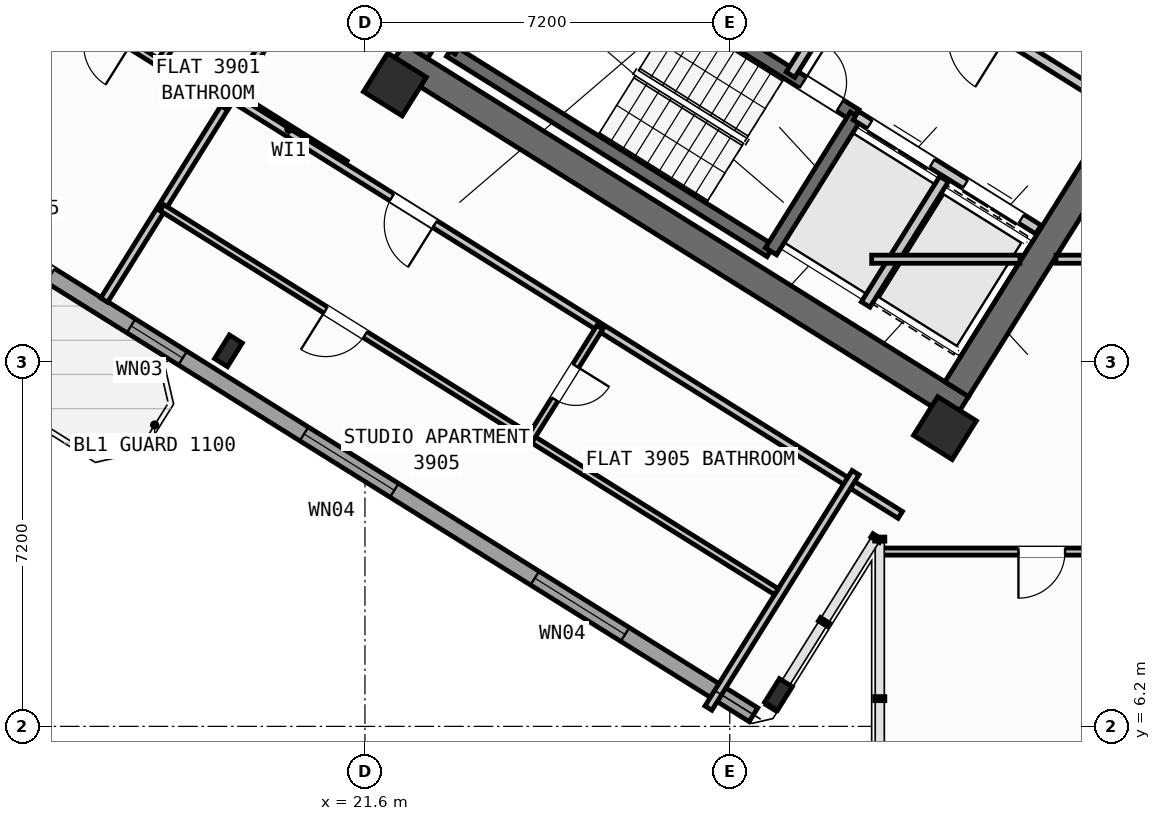
"""IFC4 building model, lengths in metres.
Left out: names, types, materials, properties, quantities, classifications, styles, units other than length and angle.
Written with IfcOpenShell. Run it as: python <this file> out.ifc"""

import sys

from ifc_helpers import new_model, si_unit, direction, frame, frame_2d, origin, origin_2d, place, context, subcontext, project, spatial, rectangle, hollow_rectangle, i_section, extrude, source, transform, mapped, element, fill, save


model = new_model("IFC4")
c1 = context("Model", 3, precision=1e-05, world=origin(), true_north=direction((0.0, 1.0)))
c2 = subcontext(c1, "Body", "Model", "MODEL_VIEW")
j1 = project(units=[si_unit("LENGTHUNIT", "METRE"), si_unit("PLANEANGLEUNIT", "RADIAN")], contexts=[c1])
p1 = place(None, origin())
s1 = spatial("IfcSite", under=j1, at=p1, CompositionType="ELEMENT")
p2 = place(p1, origin())
s2 = spatial("IfcBuilding", under=s1, at=p2, CompositionType="ELEMENT")
p3 = place(p2, frame((0.0, 0.0, 155.1)))
s3 = spatial("IfcBuildingStorey", under=s2, at=p3, CompositionType="ELEMENT", Elevation=155.1)
p4 = place(p3, frame((33.366, 12.477, 0.0), z_axis=(0.0, 0.0, 1.0), x_axis=(-0.848047359947, 0.529920442413, 0.0)))
e1 = element("IfcWall", 1, at=p4, inside=s3, PredefinedType="SHEAR", context=c2, shape_type="SweptSolid", body=[
    extrude(rectangle(XDim=13.14, YDim=0.55, at=frame_2d((6.57, 0.0))), origin(), (0.0, 0.0, 1.0), 3.35),
])
p5 = place(p3, frame((36.683, 18.304, 0.0), z_axis=(0.0, 0.0, 1.0), x_axis=(-0.529896466841, -0.848062341122, 0.0)))
e2 = element("IfcWall", 2, at=p5, inside=s3, PredefinedType="SHEAR", context=c2, shape_type="SweptSolid", body=[
    extrude(rectangle(XDim=6.425, YDim=0.55, at=frame_2d((3.212, 0.0))), origin(), (0.0, 0.0, 1.0), 3.35),
])
p6 = place(p3, frame((26.007, 24.976, 0.0), z_axis=(0.0, 0.0, 1.0), x_axis=(-0.529923795287, -0.848045264823, 0.0)))
e3 = element("IfcWall", 3, at=p6, inside=s3, PredefinedType="SHEAR", context=c2, shape_type="SweptSolid", body=[
    extrude(rectangle(XDim=6.425, YDim=0.55, at=frame_2d((3.212, 0.0))), origin(), (0.0, 0.0, 1.0), 3.35),
])
m1 = source(origin(), c2, "Body", "SweptSolid", [
    extrude(hollow_rectangle(XDim=0.9, YDim=0.9, WallThickness=0.036, at=origin_2d()), origin(), (0.0, 0.0, 1.0), 3.6),
])
p7 = place(p3, frame((33.046, 12.087, 0.0), z_axis=(0.0, 0.0, 1.0), x_axis=(-0.848048096156, 0.529919264233, 0.0)))
e4 = element("IfcColumn", 4, at=p7, inside=s3, PredefinedType="COLUMN", context=c2, shape_type="MappedRepresentation", body=[
    mapped(m1, transform((0.0, 0.0, 0.0), scale=1.0)),
])
m2 = source(origin(), c2, "Body", "SweptSolid", [
    extrude(i_section(OverallWidth=0.3, OverallDepth=0.55, WebThickness=0.015, FlangeThickness=0.029, at=origin_2d()), origin(), (0.0, 0.0, 1.0), 3.6),
])
p8 = place(p3, frame((29.761, 6.829, 0.0), z_axis=(0.0, 0.0, 1.0), x_axis=(-0.848048096156, 0.529919264233, 0.0)))
e5 = element("IfcColumn", 5, at=p8, inside=s3, PredefinedType="COLUMN", context=c2, shape_type="MappedRepresentation", body=[
    mapped(m2, transform((0.0, 0.0, 0.0), scale=1.0)),
])
p9 = place(p3, frame((22.191, 18.87, 0.0), z_axis=(0.0, 0.0, 1.0), x_axis=(-0.848048096156, 0.529919264233, 0.0)))
e6 = element("IfcColumn", 6, at=p9, inside=s3, PredefinedType="COLUMN", context=c2, shape_type="MappedRepresentation", body=[
    mapped(m1, transform((0.0, 0.0, 0.0), scale=1.0)),
])
p10 = place(p3, frame((18.906, 13.612, 0.0), z_axis=(0.0, 0.0, 1.0), x_axis=(-0.848048096156, 0.529919264233, 0.0)))
e7 = element("IfcColumn", 7, at=p10, inside=s3, PredefinedType="COLUMN", context=c2, shape_type="MappedRepresentation", body=[
    mapped(m2, transform((0.0, 0.0, 0.0), scale=1.0)),
])
p11 = place(p3, frame((29.268, 6.429, 0.0), z_axis=(0.0, 0.0, 1.0), x_axis=(-0.848049971435, 0.529916263149, 0.0)))
e8 = element("IfcWall", 8, at=p11, inside=s3, PredefinedType="STANDARD", context=c2, shape_type="SweptSolid", body=[
    extrude(rectangle(XDim=31.588, YDim=0.32, at=frame_2d((15.794, 0.0))), origin(), (0.0, 0.0, 1.0), 3.35),
])
p12 = place(p11, frame((16.362, 0.0, 0.0)))
e9 = element("IfcOpeningElement", 9, at=p12, cuts=e8, PredefinedType="OPENING", context=c2, shape_type="SweptSolid", body=[
    extrude(rectangle(XDim=1.2, YDim=2.15, at=frame_2d((0.6, 1.075))), frame((0.0, 0.17, 0.0), z_axis=(0.0, -1.0, 0.0), x_axis=(1.0, 0.0, 0.0)), (0.0, 0.0, 1.0), 0.34),
])
p13 = place(p11, frame((2.989, 0.0, 0.8)))
e10 = element("IfcOpeningElement", 10, at=p13, cuts=e8, PredefinedType="OPENING", context=c2, shape_type="SweptSolid", body=[
    extrude(rectangle(XDim=2.1, YDim=1.55, at=frame_2d((1.05, 0.775))), frame((0.0, 0.17, 0.0), z_axis=(0.0, -1.0, 0.0), x_axis=(1.0, 0.0, 0.0)), (0.0, 0.0, 1.0), 0.34),
])
p14 = place(p11, frame((8.359, 0.0, 0.8)))
e11 = element("IfcOpeningElement", 11, at=p14, cuts=e8, PredefinedType="OPENING", context=c2, shape_type="SweptSolid", body=[
    extrude(rectangle(XDim=2.1, YDim=1.55, at=frame_2d((1.05, 0.775))), frame((0.0, 0.17, 0.0), z_axis=(0.0, -1.0, 0.0), x_axis=(1.0, 0.0, 0.0)), (0.0, 0.0, 1.0), 0.34),
])
p15 = place(p11, frame((13.284, 0.0, 0.95)))
e12 = element("IfcOpeningElement", 12, at=p15, cuts=e8, PredefinedType="OPENING", context=c2, shape_type="SweptSolid", body=[
    extrude(rectangle(XDim=1.2, YDim=1.4, at=frame_2d((0.6, 0.7))), frame((0.0, 0.17, 0.0), z_axis=(0.0, -1.0, 0.0), x_axis=(1.0, 0.0, 0.0)), (0.0, 0.0, 1.0), 0.34),
])
p16 = place(p11, frame((20.259, 0.0, 0.95)))
e13 = element("IfcOpeningElement", 13, at=p16, cuts=e8, PredefinedType="OPENING", context=c2, shape_type="SweptSolid", body=[
    extrude(rectangle(XDim=1.2, YDim=1.4, at=frame_2d((0.6, 0.7))), frame((0.0, 0.17, 0.0), z_axis=(0.0, -1.0, 0.0), x_axis=(1.0, 0.0, 0.0)), (0.0, 0.0, 1.0), 0.34),
])
p17 = place(p11, frame((22.929, 0.0, 0.95)))
e14 = element("IfcOpeningElement", 14, at=p17, cuts=e8, PredefinedType="OPENING", context=c2, shape_type="SweptSolid", body=[
    extrude(rectangle(XDim=1.2, YDim=1.4, at=frame_2d((0.6, 0.7))), frame((0.0, 0.17, 0.0), z_axis=(0.0, -1.0, 0.0), x_axis=(1.0, 0.0, 0.0)), (0.0, 0.0, 1.0), 0.34),
])
p18 = place(p11, frame((27.481, 0.0, 0.8)))
e15 = element("IfcOpeningElement", 15, at=p18, cuts=e8, PredefinedType="OPENING", context=c2, shape_type="SweptSolid", body=[
    extrude(rectangle(XDim=2.1, YDim=1.55, at=frame_2d((1.05, 0.775))), frame((0.0, 0.17, 0.0), z_axis=(0.0, -1.0, 0.0), x_axis=(1.0, 0.0, 0.0)), (0.0, 0.0, 1.0), 0.34),
])
p19 = place(p3, frame((29.605, 15.581, 0.0), z_axis=(0.0, 0.0, 1.0), x_axis=(-0.848036911448, 0.529937163087, 0.0)))
e16 = element("IfcWall", 16, at=p19, inside=s3, PredefinedType="SHEAR", context=c2, shape_type="SweptSolid", body=[
    extrude(rectangle(XDim=7.46, YDim=0.26, at=frame_2d((3.73, 0.0))), origin(), (0.0, 0.0, 1.0), 3.35),
])
p20 = place(p3, frame((31.28, 18.261, 0.0), z_axis=(0.0, 0.0, 1.0), x_axis=(-0.848051618787, 0.529913626805, 0.0)))
e17 = element("IfcWall", 17, at=p20, inside=s3, PredefinedType="SHEAR", context=c2, shape_type="SweptSolid", body=[
    extrude(rectangle(XDim=7.46, YDim=0.26, at=frame_2d((3.73, 0.0))), origin(), (0.0, 0.0, 1.0), 3.35),
])
p21 = place(p20, frame((0.36, 0.0, 0.0)))
e18 = element("IfcOpeningElement", 18, at=p21, cuts=e17, PredefinedType="OPENING", context=c2, shape_type="SweptSolid", body=[
    extrude(rectangle(XDim=0.86, YDim=2.05, at=frame_2d((0.43, 1.025))), frame((0.0, 0.14, 0.0), z_axis=(0.0, -1.0, 0.0), x_axis=(1.0, 0.0, 0.0)), (0.0, 0.0, 1.0), 0.28),
])
p22 = place(p3, frame((31.288, 18.256, 0.0), z_axis=(0.0, 0.0, 1.0), x_axis=(-0.529943379326, -0.848033026897, 0.0)))
e19 = element("IfcWall", 19, at=p22, inside=s3, PredefinedType="SHEAR", context=c2, shape_type="SweptSolid", body=[
    extrude(rectangle(XDim=3.16, YDim=0.26, at=frame_2d((1.58, 0.0))), origin(), (0.0, 0.0, 1.0), 3.35),
])
p23 = place(p3, frame((24.945, 22.22, 0.0), z_axis=(0.0, 0.0, 1.0), x_axis=(-0.529908658664, -0.84805472316, 0.0)))
e20 = element("IfcWall", 20, at=p23, inside=s3, PredefinedType="SHEAR", context=c2, shape_type="SweptSolid", body=[
    extrude(rectangle(XDim=3.16, YDim=0.26, at=frame_2d((1.58, 0.0))), origin(), (0.0, 0.0, 1.0), 3.35),
])
p24 = place(p3, frame((34.891, 16.005, 0.0), z_axis=(0.0, 0.0, 1.0), x_axis=(-0.848062873452, 0.529895614884, 0.0)))
e21 = element("IfcWall", 21, at=p24, inside=s3, PredefinedType="STANDARD", context=c2, shape_type="SweptSolid", body=[
    extrude(rectangle(XDim=4.248, YDim=0.2, at=frame_2d((2.124, 0.0))), origin(), (0.0, 0.0, 1.0), 3.34),
])
p25 = place(p24, frame((0.398, 0.0, 0.0)))
e22 = element("IfcOpeningElement", 22, at=p25, cuts=e21, PredefinedType="OPENING", context=c2, shape_type="SweptSolid", body=[
    extrude(rectangle(XDim=1.3, YDim=2.2, at=frame_2d((0.65, 1.1))), frame((0.0, 0.11, 0.0), z_axis=(0.0, -1.0, 0.0), x_axis=(1.0, 0.0, 0.0)), (0.0, 0.0, 1.0), 0.22),
])
p26 = place(p24, frame((2.473, 0.0, 0.0)))
e23 = element("IfcOpeningElement", 23, at=p26, cuts=e21, PredefinedType="OPENING", context=c2, shape_type="SweptSolid", body=[
    extrude(rectangle(XDim=1.45, YDim=2.25, at=frame_2d((0.725, 1.125))), frame((0.0, 0.11, 0.0), z_axis=(0.0, -1.0, 0.0), x_axis=(1.0, 0.0, 0.0)), (0.0, 0.0, 1.0), 0.22),
])
p27 = place(p3, frame((36.417, 18.447, 0.0), z_axis=(0.0, 0.0, 1.0), x_axis=(-0.848064879198, 0.529892404805, 0.0)))
e24 = element("IfcWall", 24, at=p27, inside=s3, PredefinedType="STANDARD", context=c2, shape_type="SweptSolid", body=[
    extrude(rectangle(XDim=5.768, YDim=0.2, at=frame_2d((2.884, 0.0))), origin(), (0.0, 0.0, 1.0), 3.34),
])
p28 = place(p27, frame((2.548, 0.0, 0.0)))
e25 = element("IfcOpeningElement", 25, at=p28, cuts=e24, PredefinedType="OPENING", context=c2, shape_type="SweptSolid", body=[
    extrude(rectangle(XDim=1.15, YDim=2.1, at=frame_2d((0.575, 1.05))), frame((0.0, 0.11, 0.0), z_axis=(0.0, -1.0, 0.0), x_axis=(1.0, 0.0, 0.0)), (0.0, 0.0, 1.0), 0.22),
])
p29 = place(p3, frame((33.029, 17.003, 0.0), z_axis=(0.0, 0.0, 1.0), x_axis=(-0.529916267533, -0.848049968695, 0.0)))
e26 = element("IfcWall", 26, at=p29, inside=s3, PredefinedType="STANDARD", context=c2, shape_type="SweptSolid", body=[
    extrude(rectangle(XDim=2.92, YDim=0.2, at=frame_2d((1.46, 0.0))), origin(), (0.0, 0.0, 1.0), 3.34),
])
p30 = place(p3, frame((31.525, 21.504, 0.0), z_axis=(0.0, 0.0, 1.0), x_axis=(-0.529907497854, -0.848055448493, 0.0)))
e27 = element("IfcWall", 27, at=p30, inside=s3, PredefinedType="STANDARD", context=c2, shape_type="SweptSolid", body=[
    extrude(rectangle(XDim=2.88, YDim=0.2, at=frame_2d((1.44, 0.0))), origin(), (0.0, 0.0, 1.0), 3.34),
])
p31 = place(p3, frame((21.206, 17.292, 0.0), z_axis=(0.0, 0.0, 1.0), x_axis=(-0.848050851465, 0.529914854792, 0.0)))
e28 = element("IfcWall", 28, at=p31, inside=s3, PredefinedType="PARTITIONING", context=c2, shape_type="SweptSolid", body=[
    extrude(rectangle(XDim=2.61, YDim=0.16, at=frame_2d((1.305, 0.0))), origin(), (0.0, 0.0, 1.0), 3.34),
])
p32 = place(p3, frame((20.719, 21.44, 0.0), z_axis=(0.0, 0.0, 1.0), x_axis=(-0.529906246318, -0.848056230514, 0.0)))
e29 = element("IfcWall", 29, at=p32, inside=s3, PredefinedType="PARTITIONING", context=c2, shape_type="SweptSolid", body=[
    extrude(rectangle(XDim=8.05, YDim=0.16, at=frame_2d((4.025, 0.0))), origin(), (0.0, 0.0, 1.0), 3.34),
])
p33 = place(p3, frame((16.519, 21.87, 0.0), z_axis=(0.0, 0.0, 1.0), x_axis=(-0.529922447305, -0.848046107144, 0.0)))
e30 = element("IfcWall", 30, at=p33, inside=s3, PredefinedType="PARTITIONING", context=c2, shape_type="SweptSolid", body=[
    extrude(rectangle(XDim=5.451, YDim=0.16, at=frame_2d((2.726, 0.0))), origin(), (0.0, 0.0, 1.0), 2.775),
])
p34 = place(p3, frame((18.86, 18.464, 0.0), z_axis=(0.0, 0.0, 1.0), x_axis=(-0.848059820872, 0.529900500304, 0.0)))
e31 = element("IfcWall", 31, at=p34, inside=s3, PredefinedType="PLUMBINGWALL", context=c2, shape_type="SweptSolid", body=[
    extrude(rectangle(XDim=3.79, YDim=0.14, at=frame_2d((1.895, 0.0))), origin(), (0.0, 0.0, 1.0), 3.34),
])
p35 = place(p34, frame((2.23, 0.0, 0.0)))
e32 = element("IfcOpeningElement", 32, at=p35, cuts=e31, PredefinedType="OPENING", context=c2, shape_type="SweptSolid", body=[
    extrude(rectangle(XDim=0.92, YDim=2.08, at=frame_2d((0.46, 1.04))), frame((0.0, 0.08, 0.0), z_axis=(0.0, -1.0, 0.0), x_axis=(1.0, 0.0, 0.0)), (0.0, 0.0, 1.0), 0.16),
])
p36 = place(p3, frame((19.405, 22.261, 0.0), z_axis=(0.0, 0.0, 1.0), x_axis=(-0.529898896701, -0.848060822863, 0.0)))
e33 = element("IfcWall", 33, at=p36, inside=s3, PredefinedType="PLUMBINGWALL", context=c2, shape_type="SweptSolid", body=[
    extrude(rectangle(XDim=3.51, YDim=0.14, at=frame_2d((1.755, 0.0))), origin(), (0.0, 0.0, 1.0), 2.995),
])
p37 = place(p36, frame((1.365, 0.0, 0.0)))
e34 = element("IfcOpeningElement", 34, at=p37, cuts=e33, PredefinedType="OPENING", context=c2, shape_type="SweptSolid", body=[
    extrude(rectangle(XDim=0.78, YDim=2.05, at=frame_2d((0.39, 1.025))), frame((0.0, 0.08, 0.0), z_axis=(0.0, -1.0, 0.0), x_axis=(1.0, 0.0, 0.0)), (0.0, 0.0, 1.0), 0.16),
])
p38 = place(p3, frame((32.164, 10.374, 0.0), z_axis=(0.0, 0.0, 1.0), x_axis=(-0.848044107957, 0.529925646633, 0.0)))
e35 = element("IfcWall", 35, at=p38, inside=s3, PredefinedType="PARTITIONING", context=c2, shape_type="SweptSolid", body=[
    extrude(rectangle(XDim=15.57, YDim=0.16, at=frame_2d((7.785, 0.0))), origin(), (0.0, 0.0, 1.0), 3.34),
])
p39 = place(p38, frame((10.83, 0.0, 0.0)))
e36 = element("IfcOpeningElement", 36, at=p39, cuts=e35, PredefinedType="OPENING", context=c2, shape_type="SweptSolid", body=[
    extrude(rectangle(XDim=1.0, YDim=2.1, at=frame_2d((0.5, 1.05))), frame((0.0, 0.09, 0.0), z_axis=(0.0, -1.0, 0.0), x_axis=(1.0, 0.0, 0.0)), (0.0, 0.0, 1.0), 0.18),
])
p40 = place(p3, frame((31.282, 11.208, 0.0), z_axis=(0.0, 0.0, 1.0), x_axis=(-0.529938869374, -0.84803584519, 0.0)))
e37 = element("IfcWall", 37, at=p40, inside=s3, PredefinedType="PARTITIONING", context=c2, shape_type="SweptSolid", body=[
    extrude(rectangle(XDim=5.48, YDim=0.16, at=frame_2d((2.74, 0.0))), origin(), (0.0, 0.0, 1.0), 3.34),
])
p41 = place(p3, frame((29.72, 8.859, 0.0), z_axis=(0.0, 0.0, 1.0), x_axis=(-0.848049134363, 0.529917602752, 0.0)))
e38 = element("IfcWall", 38, at=p41, inside=s3, PredefinedType="PLUMBINGWALL", context=c2, shape_type="SweptSolid", body=[
    extrude(rectangle(XDim=14.3, YDim=0.14, at=frame_2d((7.15, 0.0))), origin(), (0.0, 0.0, 1.0), 3.34),
])
p42 = place(p41, frame((9.57, 0.0, 0.0)))
e39 = element("IfcOpeningElement", 39, at=p42, cuts=e38, PredefinedType="OPENING", context=c2, shape_type="SweptSolid", body=[
    extrude(rectangle(XDim=0.92, YDim=2.08, at=frame_2d((0.46, 1.04))), frame((0.0, 0.08, 0.0), z_axis=(0.0, -1.0, 0.0), x_axis=(1.0, 0.0, 0.0)), (0.0, 0.0, 1.0), 0.16),
])
p43 = place(p3, frame((26.237, 14.078, 0.0), z_axis=(0.0, 0.0, 1.0), x_axis=(-0.52995640672, -0.848024885824, 0.0)))
e40 = element("IfcWall", 40, at=p43, inside=s3, PredefinedType="PLUMBINGWALL", context=c2, shape_type="SweptSolid", body=[
    extrude(rectangle(XDim=2.58, YDim=0.14, at=frame_2d((1.29, 0.0))), origin(), (0.0, 0.0, 1.0), 3.34),
])
p44 = place(p43, frame((0.9, 0.0, 0.0)))
e41 = element("IfcOpeningElement", 41, at=p44, cuts=e40, PredefinedType="OPENING", context=c2, shape_type="SweptSolid", body=[
    extrude(rectangle(XDim=0.78, YDim=2.05, at=frame_2d((0.39, 1.025))), frame((0.0, 0.08, 0.0), z_axis=(0.0, -1.0, 0.0), x_axis=(1.0, 0.0, 0.0)), (0.0, 0.0, 1.0), 0.16),
])
p45 = place(p3, frame((31.6, 15.42, 0.0), z_axis=(0.0, 0.0, 1.0), x_axis=(1.0, 0.0, 0.0)))
e42 = element("IfcWall", 42, at=p45, inside=s3, PredefinedType="PARTITIONING", context=c2, shape_type="SweptSolid", body=[
    extrude(rectangle(XDim=2.925, YDim=0.16, at=frame_2d((1.462, 0.0))), origin(), (0.0, 0.0, 1.0), 3.34),
])
p46 = place(p3, frame((35.237, 15.42, 0.0), z_axis=(0.0, 0.0, 1.0), x_axis=(1.0, 0.0, 0.0)))
e43 = element("IfcWall", 43, at=p46, inside=s3, PredefinedType="PARTITIONING", context=c2, shape_type="SweptSolid", body=[
    extrude(rectangle(XDim=15.432, YDim=0.16, at=frame_2d((7.716, 0.0))), origin(), (0.0, 0.0, 1.0), 3.34),
])
p47 = place(p46, frame((0.969, 0.0, 0.0)))
e44 = element("IfcOpeningElement", 44, at=p47, cuts=e43, PredefinedType="OPENING", context=c2, shape_type="SweptSolid", body=[
    extrude(rectangle(XDim=1.0, YDim=2.1, at=frame_2d((0.5, 1.05))), frame((0.0, 0.09, 0.0), z_axis=(0.0, -1.0, 0.0), x_axis=(1.0, 0.0, 0.0)), (0.0, 0.0, 1.0), 0.18),
])
p48 = place(p46, frame((8.799, 0.0, 0.0)))
e45 = element("IfcOpeningElement", 45, at=p48, cuts=e43, PredefinedType="OPENING", context=c2, shape_type="SweptSolid", body=[
    extrude(rectangle(XDim=1.0, YDim=2.1, at=frame_2d((0.5, 1.05))), frame((0.0, 0.09, 0.0), z_axis=(0.0, -1.0, 0.0), x_axis=(1.0, 0.0, 0.0)), (0.0, 0.0, 1.0), 0.18),
])
p49 = place(p3, frame((31.74, 9.65, 0.0), z_axis=(0.0, 0.0, 1.0), x_axis=(1.0, 0.0, 0.0)))
e46 = element("IfcWall", 46, at=p49, inside=s3, PredefinedType="PLUMBINGWALL", context=c2, shape_type="SweptSolid", body=[
    extrude(rectangle(XDim=6.073, YDim=0.14, at=frame_2d((3.037, 0.0))), origin(), (0.0, 0.0, 1.0), 3.34),
])
p50 = place(p49, frame((2.757, 0.0, 0.0)))
e47 = element("IfcOpeningElement", 47, at=p50, cuts=e46, PredefinedType="OPENING", context=c2, shape_type="SweptSolid", body=[
    extrude(rectangle(XDim=0.92, YDim=2.08, at=frame_2d((0.46, 1.04))), frame((0.0, 0.08, 0.0), z_axis=(0.0, -1.0, 0.0), x_axis=(1.0, 0.0, 0.0)), (0.0, 0.0, 1.0), 0.16),
])
m3 = source(origin(), c2, "Body", "SweptSolid", [
    extrude(rectangle(XDim=2.1, YDim=1.55, at=frame_2d((1.05, 0.775))), frame((0.0, 0.03, 0.0), z_axis=(0.0, -1.0, 0.0), x_axis=(1.0, 0.0, 0.0)), (0.0, 0.0, 1.0), 0.06),
])
p51 = place(p13, origin())
e48 = element("IfcWindow", 48, at=p51, inside=s3, PartitioningType="SINGLE_PANEL", PredefinedType="WINDOW", context=c2, shape_type="MappedRepresentation", body=[
    mapped(m3, transform((0.0, 0.0, 0.0), scale=1.0)),
])
fill(e10, e48)
p52 = place(p14, origin())
e49 = element("IfcWindow", 49, at=p52, inside=s3, PartitioningType="SINGLE_PANEL", PredefinedType="WINDOW", context=c2, shape_type="MappedRepresentation", body=[
    mapped(m3, transform((0.0, 0.0, 0.0), scale=1.0)),
])
fill(e11, e49)
m4 = source(origin(), c2, "Body", "SweptSolid", [
    extrude(rectangle(XDim=1.2, YDim=1.4, at=frame_2d((0.6, 0.7))), frame((0.0, 0.03, 0.0), z_axis=(0.0, -1.0, 0.0), x_axis=(1.0, 0.0, 0.0)), (0.0, 0.0, 1.0), 0.06),
])
p53 = place(p15, origin())
e50 = element("IfcWindow", 50, at=p53, inside=s3, PartitioningType="SINGLE_PANEL", PredefinedType="WINDOW", context=c2, shape_type="MappedRepresentation", body=[
    mapped(m4, transform((0.0, 0.0, 0.0), scale=1.0)),
])
fill(e12, e50)
m5 = source(origin(), c2, "Body", "SweptSolid", [
    extrude(rectangle(XDim=0.86, YDim=2.05, at=frame_2d((0.43, 1.025))), frame((0.0, 0.025, 0.0), z_axis=(0.0, -1.0, 0.0), x_axis=(1.0, 0.0, 0.0)), (0.0, 0.0, 1.0), 0.05),
])
p54 = place(p21, frame((0.86, 0.0, 0.0), z_axis=(0.0, 0.0, 1.0), x_axis=(-1.0, 0.0, 0.0)))
e51 = element("IfcDoor", 51, at=p54, inside=s3, OperationType="SINGLE_SWING_LEFT", PredefinedType="DOOR", context=c2, shape_type="MappedRepresentation", body=[
    mapped(m5, transform((0.0, 0.0, 0.0), scale=1.0)),
])
fill(e18, e51)
m6 = source(origin(), c2, "Body", "SweptSolid", [
    extrude(rectangle(XDim=1.3, YDim=2.2, at=frame_2d((0.65, 1.1))), frame((0.0, 0.025, 0.0), z_axis=(0.0, -1.0, 0.0), x_axis=(1.0, 0.0, 0.0)), (0.0, 0.0, 1.0), 0.05),
])
p55 = place(p25, origin())
e52 = element("IfcDoor", 52, at=p55, inside=s3, OperationType="DOUBLE_DOOR_SLIDING", PredefinedType="DOOR", context=c2, shape_type="MappedRepresentation", body=[
    mapped(m6, transform((0.0, 0.0, 0.0), scale=1.0)),
])
fill(e22, e52)
m7 = source(origin(), c2, "Body", "SweptSolid", [
    extrude(rectangle(XDim=1.45, YDim=2.25, at=frame_2d((0.725, 1.125))), frame((0.0, 0.025, 0.0), z_axis=(0.0, -1.0, 0.0), x_axis=(1.0, 0.0, 0.0)), (0.0, 0.0, 1.0), 0.05),
])
p56 = place(p26, origin())
e53 = element("IfcDoor", 53, at=p56, inside=s3, OperationType="DOUBLE_DOOR_SLIDING", PredefinedType="DOOR", context=c2, shape_type="MappedRepresentation", body=[
    mapped(m7, transform((0.0, 0.0, 0.0), scale=1.0)),
])
fill(e23, e53)
m8 = source(origin(), c2, "Body", "SweptSolid", [
    extrude(rectangle(XDim=1.0, YDim=2.1, at=frame_2d((0.5, 1.05))), frame((0.0, 0.025, 0.0), z_axis=(0.0, -1.0, 0.0), x_axis=(1.0, 0.0, 0.0)), (0.0, 0.0, 1.0), 0.05),
])
p57 = place(p39, origin())
e54 = element("IfcDoor", 54, at=p57, inside=s3, OperationType="SINGLE_SWING_LEFT", PredefinedType="DOOR", context=c2, shape_type="MappedRepresentation", body=[
    mapped(m8, transform((0.0, 0.0, 0.0), scale=1.0)),
])
fill(e36, e54)
m9 = source(origin(), c2, "Body", "SweptSolid", [
    extrude(rectangle(XDim=0.92, YDim=2.08, at=frame_2d((0.46, 1.04))), frame((0.0, 0.025, 0.0), z_axis=(0.0, -1.0, 0.0), x_axis=(1.0, 0.0, 0.0)), (0.0, 0.0, 1.0), 0.05),
])
p58 = place(p42, origin())
e55 = element("IfcDoor", 55, at=p58, inside=s3, OperationType="SINGLE_SWING_RIGHT", PredefinedType="DOOR", context=c2, shape_type="MappedRepresentation", body=[
    mapped(m9, transform((0.0, 0.0, 0.0), scale=1.0)),
])
fill(e39, e55)
m10 = source(origin(), c2, "Body", "SweptSolid", [
    extrude(rectangle(XDim=0.78, YDim=2.05, at=frame_2d((0.39, 1.025))), frame((0.0, 0.025, 0.0), z_axis=(0.0, -1.0, 0.0), x_axis=(1.0, 0.0, 0.0)), (0.0, 0.0, 1.0), 0.05),
])
p59 = place(p44, origin())
e56 = element("IfcDoor", 56, at=p59, inside=s3, OperationType="SINGLE_SWING_LEFT", PredefinedType="DOOR", context=c2, shape_type="MappedRepresentation", body=[
    mapped(m10, transform((0.0, 0.0, 0.0), scale=1.0)),
])
fill(e41, e56)
p60 = place(p50, frame((0.92, 0.0, 0.0), z_axis=(0.0, 0.0, 1.0), x_axis=(-1.0, 0.0, 0.0)))
e57 = element("IfcDoor", 57, at=p60, inside=s3, OperationType="SINGLE_SWING_RIGHT", PredefinedType="DOOR", context=c2, shape_type="MappedRepresentation", body=[
    mapped(m9, transform((0.0, 0.0, 0.0), scale=1.0)),
])
fill(e47, e57)
save(model, sys.argv[1])
